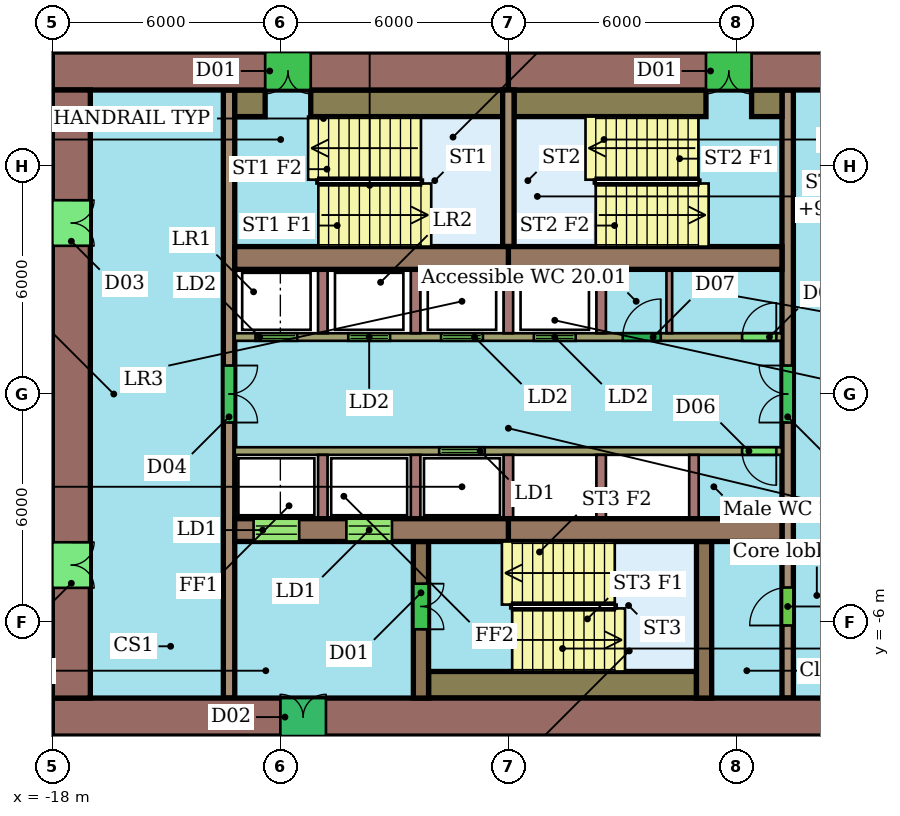
"""IFC4 building model, lengths in metres.
Left out: names, types, materials, properties, quantities, classifications, styles, units other than length and angle.
Written with IfcOpenShell. Run it as: python <this file> out.ifc"""

import sys

from ifc_helpers import new_model, si_unit, direction, frame, frame_2d, origin, place, context, subcontext, project, spatial, rectangle, extrude, element, fill, save


model = new_model("IFC4")
c1 = context("Model", 3, precision=1e-05, world=origin(), true_north=direction((0.0, 1.0)))
c2 = subcontext(c1, "Body", "Model", "MODEL_VIEW")
j1 = project(units=[si_unit("LENGTHUNIT", "METRE"), si_unit("PLANEANGLEUNIT", "RADIAN")], contexts=[c1])
p1 = place(None, origin())
s1 = spatial("IfcSite", under=j1, at=p1, CompositionType="ELEMENT")
p2 = place(p1, origin())
s2 = spatial("IfcBuilding", under=s1, at=p2, CompositionType="ELEMENT")
p3 = place(p2, frame((0.0, 0.0, 92.2)))
s3 = spatial("IfcBuildingStorey", under=s2, at=p3, CompositionType="ELEMENT", Elevation=92.2)
p4 = place(p3, frame((6.0, 8.5, 0.0), z_axis=(0.0, 0.0, 1.0), x_axis=(-1.0, 0.0, 0.0)))
e1 = element("IfcWall", 1, at=p4, inside=s3, PredefinedType="SHEAR", context=c2, shape_type="SweptSolid", body=[
    extrude(rectangle(XDim=12.0, YDim=1.0, at=frame_2d((6.0, 0.0))), origin(), (0.0, 0.0, 1.0), 3.3),
])
p5 = place(p4, frame((5.6, 0.0, 0.0)))
e2 = element("IfcOpeningElement", 2, at=p5, cuts=e1, PredefinedType="OPENING", context=c2, shape_type="SweptSolid", body=[
    extrude(rectangle(XDim=1.2, YDim=2.1, at=frame_2d((0.6, 1.05))), frame((0.0, 0.51, 0.0), z_axis=(0.0, -1.0, 0.0), x_axis=(1.0, 0.0, 0.0)), (0.0, 0.0, 1.0), 1.02),
])
p6 = place(p3, frame((-6.0, 8.5, 0.0), z_axis=(0.0, 0.0, 1.0), x_axis=(-1.0, 0.0, 0.0)))
e3 = element("IfcWall", 3, at=p6, inside=s3, PredefinedType="SHEAR", context=c2, shape_type="SweptSolid", body=[
    extrude(rectangle(XDim=12.0, YDim=1.0, at=frame_2d((6.0, 0.0))), origin(), (0.0, 0.0, 1.0), 3.3),
])
p7 = place(p6, frame((5.2, 0.0, 0.0)))
e4 = element("IfcOpeningElement", 4, at=p7, cuts=e3, PredefinedType="OPENING", context=c2, shape_type="SweptSolid", body=[
    extrude(rectangle(XDim=1.2, YDim=2.1, at=frame_2d((0.6, 1.05))), frame((0.0, 0.51, 0.0), z_axis=(0.0, -1.0, 0.0), x_axis=(1.0, 0.0, 0.0)), (0.0, 0.0, 1.0), 1.02),
])
p8 = place(p3, frame((-18.0, -8.5, 0.0), z_axis=(0.0, 0.0, 1.0), x_axis=(1.0, 0.0, 0.0)))
e5 = element("IfcWall", 5, at=p8, inside=s3, PredefinedType="SHEAR", context=c2, shape_type="SweptSolid", body=[
    extrude(rectangle(XDim=24.0, YDim=1.0, at=frame_2d((12.0, 0.0))), origin(), (0.0, 0.0, 1.0), 3.3),
])
p9 = place(p8, frame((6.0, 0.0, 0.0)))
e6 = element("IfcOpeningElement", 6, at=p9, cuts=e5, PredefinedType="OPENING", context=c2, shape_type="SweptSolid", body=[
    extrude(rectangle(XDim=1.2, YDim=2.1, at=frame_2d((0.6, 1.05))), frame((0.0, 0.51, 0.0), z_axis=(0.0, -1.0, 0.0), x_axis=(1.0, 0.0, 0.0)), (0.0, 0.0, 1.0), 1.02),
])
p10 = place(p3, frame((-17.5, 8.0, 0.0), z_axis=(0.0, 0.0, 1.0), x_axis=(0.0, -1.0, 0.0)))
e7 = element("IfcWall", 7, at=p10, inside=s3, PredefinedType="SHEAR", context=c2, shape_type="SweptSolid", body=[
    extrude(rectangle(XDim=16.0, YDim=1.0, at=frame_2d((8.0, 0.0))), origin(), (0.0, 0.0, 1.0), 3.3),
])
p11 = place(p10, frame((11.9, 0.0, 0.0)))
e8 = element("IfcOpeningElement", 8, at=p11, cuts=e7, PredefinedType="OPENING", context=c2, shape_type="SweptSolid", body=[
    extrude(rectangle(XDim=1.2, YDim=2.1, at=frame_2d((0.6, 1.05))), frame((0.0, 0.51, 0.0), z_axis=(0.0, -1.0, 0.0), x_axis=(1.0, 0.0, 0.0)), (0.0, 0.0, 1.0), 1.02),
])
p12 = place(p10, frame((2.9, 0.0, 0.0)))
e9 = element("IfcOpeningElement", 9, at=p12, cuts=e7, PredefinedType="OPENING", context=c2, shape_type="SweptSolid", body=[
    extrude(rectangle(XDim=1.2, YDim=2.1, at=frame_2d((0.6, 1.05))), frame((0.0, 0.51, 0.0), z_axis=(0.0, -1.0, 0.0), x_axis=(1.0, 0.0, 0.0)), (0.0, 0.0, 1.0), 1.02),
])
for number, where, z_axis, x_axis in (
    (10, (-13.2, 3.58, 0.0), (0.0, 0.0, 1.0), (1.0, 0.0, 0.0)),
    (11, (-6.0, 3.58, 0.0), (0.0, 0.0, 1.0), (1.0, 0.0, 0.0)),
):
    element("IfcWall", number, at=place(p3, frame(where, z_axis=z_axis, x_axis=x_axis)), inside=s3, PredefinedType="SHEAR", context=c2, shape_type="SweptSolid", body=[
        extrude(rectangle(XDim=7.2, YDim=0.6, at=frame_2d((3.6, 0.0))), origin(), (0.0, 0.0, 1.0), 3.3),
    ])
p13 = place(p3, frame((-13.2, -3.58, 0.0), z_axis=(0.0, 0.0, 1.0), x_axis=(1.0, 0.0, 0.0)))
e12 = element("IfcWall", 12, at=p13, inside=s3, PredefinedType="SHEAR", context=c2, shape_type="SweptSolid", body=[
    extrude(rectangle(XDim=7.2, YDim=0.6, at=frame_2d((3.6, 0.0))), origin(), (0.0, 0.0, 1.0), 3.3),
])
p14 = place(p13, frame((0.496, 0.0, 0.0)))
e13 = element("IfcOpeningElement", 13, at=p14, cuts=e12, PredefinedType="OPENING", context=c2, shape_type="SweptSolid", body=[
    extrude(rectangle(XDim=1.2, YDim=2.1, at=frame_2d((0.6, 1.05))), frame((0.0, 0.31, 0.0), z_axis=(0.0, -1.0, 0.0), x_axis=(1.0, 0.0, 0.0)), (0.0, 0.0, 1.0), 0.62),
])
p15 = place(p13, frame((2.938, 0.0, 0.0)))
e14 = element("IfcOpeningElement", 14, at=p15, cuts=e12, PredefinedType="OPENING", context=c2, shape_type="SweptSolid", body=[
    extrude(rectangle(XDim=1.2, YDim=2.1, at=frame_2d((0.6, 1.05))), frame((0.0, 0.31, 0.0), z_axis=(0.0, -1.0, 0.0), x_axis=(1.0, 0.0, 0.0)), (0.0, 0.0, 1.0), 0.62),
])
p16 = place(p3, frame((-6.0, -3.58, 0.0), z_axis=(0.0, 0.0, 1.0), x_axis=(1.0, 0.0, 0.0)))
e15 = element("IfcWall", 15, at=p16, inside=s3, PredefinedType="SHEAR", context=c2, shape_type="SweptSolid", body=[
    extrude(rectangle(XDim=7.2, YDim=0.6, at=frame_2d((3.6, 0.0))), origin(), (0.0, 0.0, 1.0), 3.3),
])
p17 = place(p3, frame((-13.35, 8.0, 0.0), z_axis=(0.0, 0.0, 1.0), x_axis=(0.0, -1.0, 0.0)))
e16 = element("IfcWall", 16, at=p17, inside=s3, PredefinedType="SHEAR", context=c2, shape_type="SweptSolid", body=[
    extrude(rectangle(XDim=16.0, YDim=0.3, at=frame_2d((8.0, 0.0))), origin(), (0.0, 0.0, 1.0), 3.3),
])
p18 = place(p17, frame((7.25, 0.0, 0.0)))
e17 = element("IfcOpeningElement", 17, at=p18, cuts=e16, PredefinedType="OPENING", context=c2, shape_type="SweptSolid", body=[
    extrude(rectangle(XDim=1.5, YDim=2.1, at=frame_2d((0.75, 1.05))), frame((0.0, 0.16, 0.0), z_axis=(0.0, -1.0, 0.0), x_axis=(1.0, 0.0, 0.0)), (0.0, 0.0, 1.0), 0.32),
])
p19 = place(p3, frame((1.35, -8.0, 0.0), z_axis=(0.0, 0.0, 1.0), x_axis=(0.0, 1.0, 0.0)))
e18 = element("IfcWall", 18, at=p19, inside=s3, PredefinedType="SHEAR", context=c2, shape_type="SweptSolid", body=[
    extrude(rectangle(XDim=16.0, YDim=0.3, at=frame_2d((8.0, 0.0))), origin(), (0.0, 0.0, 1.0), 3.3),
])
p20 = place(p19, frame((1.91, 0.0, 0.0)))
e19 = element("IfcOpeningElement", 19, at=p20, cuts=e18, PredefinedType="OPENING", context=c2, shape_type="SweptSolid", body=[
    extrude(rectangle(XDim=1.0, YDim=2.1, at=frame_2d((0.5, 1.05))), frame((0.0, 0.16, 0.0), z_axis=(0.0, -1.0, 0.0), x_axis=(1.0, 0.0, 0.0)), (0.0, 0.0, 1.0), 0.32),
])
p21 = place(p19, frame((7.25, 0.0, 0.0)))
e20 = element("IfcOpeningElement", 20, at=p21, cuts=e18, PredefinedType="OPENING", context=c2, shape_type="SweptSolid", body=[
    extrude(rectangle(XDim=1.5, YDim=2.1, at=frame_2d((0.75, 1.05))), frame((0.0, 0.16, 0.0), z_axis=(0.0, -1.0, 0.0), x_axis=(1.0, 0.0, 0.0)), (0.0, 0.0, 1.0), 0.32),
])
p22 = place(p3, frame((-13.2, 1.5, 0.0), z_axis=(0.0, 0.0, 1.0), x_axis=(1.0, 0.0, 0.0)))
e21 = element("IfcWall", 21, at=p22, inside=s3, PredefinedType="SHEAR", context=c2, shape_type="SweptSolid", body=[
    extrude(rectangle(XDim=14.4, YDim=0.2, at=frame_2d((7.2, 0.0))), origin(), (0.0, 0.0, 1.0), 3.3),
])
p23 = place(p22, frame((0.546, 0.0, 0.0)))
e22 = element("IfcOpeningElement", 22, at=p23, cuts=e21, PredefinedType="OPENING", context=c2, shape_type="SweptSolid", body=[
    extrude(rectangle(XDim=1.1, YDim=2.1, at=frame_2d((0.55, 1.05))), frame((0.0, 0.11, 0.0), z_axis=(0.0, -1.0, 0.0), x_axis=(1.0, 0.0, 0.0)), (0.0, 0.0, 1.0), 0.22),
])
p24 = place(p22, frame((2.988, 0.0, 0.0)))
e23 = element("IfcOpeningElement", 23, at=p24, cuts=e21, PredefinedType="OPENING", context=c2, shape_type="SweptSolid", body=[
    extrude(rectangle(XDim=1.1, YDim=2.1, at=frame_2d((0.55, 1.05))), frame((0.0, 0.11, 0.0), z_axis=(0.0, -1.0, 0.0), x_axis=(1.0, 0.0, 0.0)), (0.0, 0.0, 1.0), 0.22),
])
p25 = place(p22, frame((5.429, 0.0, 0.0)))
e24 = element("IfcOpeningElement", 24, at=p25, cuts=e21, PredefinedType="OPENING", context=c2, shape_type="SweptSolid", body=[
    extrude(rectangle(XDim=1.1, YDim=2.1, at=frame_2d((0.55, 1.05))), frame((0.0, 0.11, 0.0), z_axis=(0.0, -1.0, 0.0), x_axis=(1.0, 0.0, 0.0)), (0.0, 0.0, 1.0), 0.22),
])
p26 = place(p22, frame((7.871, 0.0, 0.0)))
e25 = element("IfcOpeningElement", 25, at=p26, cuts=e21, PredefinedType="OPENING", context=c2, shape_type="SweptSolid", body=[
    extrude(rectangle(XDim=1.1, YDim=2.1, at=frame_2d((0.55, 1.05))), frame((0.0, 0.11, 0.0), z_axis=(0.0, -1.0, 0.0), x_axis=(1.0, 0.0, 0.0)), (0.0, 0.0, 1.0), 0.22),
])
p27 = place(p22, frame((10.21, 0.0, 0.0)))
e26 = element("IfcOpeningElement", 26, at=p27, cuts=e21, PredefinedType="OPENING", context=c2, shape_type="SweptSolid", body=[
    extrude(rectangle(XDim=1.0, YDim=2.1, at=frame_2d((0.5, 1.05))), frame((0.0, 0.11, 0.0), z_axis=(0.0, -1.0, 0.0), x_axis=(1.0, 0.0, 0.0)), (0.0, 0.0, 1.0), 0.22),
])
p28 = place(p22, frame((13.35, 0.0, 0.0)))
e27 = element("IfcOpeningElement", 27, at=p28, cuts=e21, PredefinedType="OPENING", context=c2, shape_type="SweptSolid", body=[
    extrude(rectangle(XDim=0.9, YDim=2.1, at=frame_2d((0.45, 1.05))), frame((0.0, 0.11, 0.0), z_axis=(0.0, -1.0, 0.0), x_axis=(1.0, 0.0, 0.0)), (0.0, 0.0, 1.0), 0.22),
])
p29 = place(p3, frame((1.2, -1.5, 0.0), z_axis=(0.0, 0.0, 1.0), x_axis=(-1.0, 0.0, 0.0)))
e28 = element("IfcWall", 28, at=p29, inside=s3, PredefinedType="SHEAR", context=c2, shape_type="SweptSolid", body=[
    extrude(rectangle(XDim=14.4, YDim=0.2, at=frame_2d((7.2, 0.0))), origin(), (0.0, 0.0, 1.0), 3.3),
])
p30 = place(p29, frame((7.821, 0.0, 0.0)))
e29 = element("IfcOpeningElement", 29, at=p30, cuts=e28, PredefinedType="OPENING", context=c2, shape_type="SweptSolid", body=[
    extrude(rectangle(XDim=1.2, YDim=2.1, at=frame_2d((0.6, 1.05))), frame((0.0, 0.11, 0.0), z_axis=(0.0, -1.0, 0.0), x_axis=(1.0, 0.0, 0.0)), (0.0, 0.0, 1.0), 0.22),
])
p31 = place(p29, frame((0.15, 0.0, 0.0)))
e30 = element("IfcOpeningElement", 30, at=p31, cuts=e28, PredefinedType="OPENING", context=c2, shape_type="SweptSolid", body=[
    extrude(rectangle(XDim=0.9, YDim=2.1, at=frame_2d((0.45, 1.05))), frame((0.0, 0.11, 0.0), z_axis=(0.0, -1.0, 0.0), x_axis=(1.0, 0.0, 0.0)), (0.0, 0.0, 1.0), 0.22),
])
p32 = place(p3, frame((-8.3, -3.88, 0.0), z_axis=(0.0, 0.0, 1.0), x_axis=(0.0, -1.0, 0.0)))
e31 = element("IfcWall", 31, at=p32, inside=s3, PredefinedType="SHEAR", context=c2, shape_type="SweptSolid", body=[
    extrude(rectangle(XDim=4.12, YDim=0.4, at=frame_2d((2.06, 0.0))), origin(), (0.0, 0.0, 1.0), 3.3),
])
p33 = place(p32, frame((1.11, 0.0, 0.0)))
e32 = element("IfcOpeningElement", 32, at=p33, cuts=e31, PredefinedType="OPENING", context=c2, shape_type="SweptSolid", body=[
    extrude(rectangle(XDim=1.2, YDim=2.1, at=frame_2d((0.6, 1.05))), frame((0.0, 0.21, 0.0), z_axis=(0.0, -1.0, 0.0), x_axis=(1.0, 0.0, 0.0)), (0.0, 0.0, 1.0), 0.42),
])
p34 = place(p3, frame((-0.85, -3.88, 0.0), z_axis=(0.0, 0.0, 1.0), x_axis=(0.0, -1.0, 0.0)))
e33 = element("IfcWall", 33, at=p34, inside=s3, PredefinedType="SHEAR", context=c2, shape_type="SweptSolid", body=[
    extrude(rectangle(XDim=4.12, YDim=0.4, at=frame_2d((2.06, 0.0))), origin(), (0.0, 0.0, 1.0), 3.3),
])
p35 = place(p3, frame((-6.0, 3.88, 0.0), z_axis=(0.0, 0.0, 1.0), x_axis=(0.0, 1.0, 0.0)))
e34 = element("IfcWall", 34, at=p35, inside=s3, PredefinedType="SHEAR", context=c2, shape_type="SweptSolid", body=[
    extrude(rectangle(XDim=4.12, YDim=0.3, at=frame_2d((2.06, 0.0))), origin(), (0.0, 0.0, 1.0), 3.3),
])
p36 = place(p3, frame((-13.2, 7.65, 0.0), z_axis=(0.0, 0.0, 1.0), x_axis=(1.0, 0.0, 0.0)))
e35 = element("IfcWall", 35, at=p36, inside=s3, PredefinedType="SHEAR", context=c2, shape_type="SweptSolid", body=[
    extrude(rectangle(XDim=0.8, YDim=0.7, at=frame_2d((0.4, 0.0))), origin(), (0.0, 0.0, 1.0), 3.3),
])
for number, where, z_axis, x_axis in (
    (36, (-11.2, 7.65, 0.0), (0.0, 0.0, 1.0), (1.0, 0.0, 0.0)),
    (37, (-5.85, 7.65, 0.0), (0.0, 0.0, 1.0), (1.0, 0.0, 0.0)),
):
    element("IfcWall", number, at=place(p3, frame(where, z_axis=z_axis, x_axis=x_axis)), inside=s3, PredefinedType="SHEAR", context=c2, shape_type="SweptSolid", body=[
        extrude(rectangle(XDim=5.05, YDim=0.7, at=frame_2d((2.525, 0.0))), origin(), (0.0, 0.0, 1.0), 3.3),
    ])
p37 = place(p3, frame((0.4, 7.65, 0.0), z_axis=(0.0, 0.0, 1.0), x_axis=(1.0, 0.0, 0.0)))
e38 = element("IfcWall", 38, at=p37, inside=s3, PredefinedType="SHEAR", context=c2, shape_type="SweptSolid", body=[
    extrude(rectangle(XDim=0.8, YDim=0.7, at=frame_2d((0.4, 0.0))), origin(), (0.0, 0.0, 1.0), 3.3),
])
p38 = place(p3, frame((-8.1, -7.65, 0.0), z_axis=(0.0, 0.0, 1.0), x_axis=(1.0, 0.0, 0.0)))
e39 = element("IfcWall", 39, at=p38, inside=s3, PredefinedType="SHEAR", context=c2, shape_type="SweptSolid", body=[
    extrude(rectangle(XDim=7.05, YDim=0.7, at=frame_2d((3.525, 0.0))), origin(), (0.0, 0.0, 1.0), 3.3),
])
for number, where, z_axis, x_axis in (
    (40, (-10.883, 1.6, 0.0), (0.0, 0.0, 1.0), (0.0, 1.0, 0.0)),
    (41, (-8.442, 1.6, 0.0), (0.0, 0.0, 1.0), (0.0, 1.0, 0.0)),
    (42, (-6.0, 1.6, 0.0), (0.0, 0.0, 1.0), (0.0, 1.0, 0.0)),
    (43, (-3.558, 1.6, 0.0), (0.0, 0.0, 1.0), (0.0, 1.0, 0.0)),
):
    element("IfcWall", number, at=place(p3, frame(where, z_axis=z_axis, x_axis=x_axis)), inside=s3, PredefinedType="SHEAR", context=c2, shape_type="SweptSolid", body=[
        extrude(rectangle(XDim=1.68, YDim=0.25, at=frame_2d((0.84, 0.0))), origin(), (0.0, 0.0, 1.0), 3.3),
    ])
p39 = place(p3, frame((-1.765, 1.6, 0.0), z_axis=(0.0, 0.0, 1.0), x_axis=(0.0, 1.0, 0.0)))
e44 = element("IfcWall", 44, at=p39, inside=s3, PredefinedType="PARTITIONING", context=c2, shape_type="SweptSolid", body=[
    extrude(rectangle(XDim=1.68, YDim=0.15, at=frame_2d((0.84, 0.0))), origin(), (0.0, 0.0, 1.0), 3.3),
])
for number, where, z_axis, x_axis in (
    (45, (-10.883, -1.6, 0.0), (0.0, 0.0, 1.0), (0.0, -1.0, 0.0)),
    (46, (-8.442, -1.6, 0.0), (0.0, 0.0, 1.0), (0.0, -1.0, 0.0)),
    (47, (-6.0, -1.6, 0.0), (0.0, 0.0, 1.0), (0.0, -1.0, 0.0)),
    (48, (-3.558, -1.6, 0.0), (0.0, 0.0, 1.0), (0.0, -1.0, 0.0)),
    (49, (-1.117, -1.6, 0.0), (0.0, 0.0, 1.0), (0.0, -1.0, 0.0)),
):
    element("IfcWall", number, at=place(p3, frame(where, z_axis=z_axis, x_axis=x_axis)), inside=s3, PredefinedType="SHEAR", context=c2, shape_type="SweptSolid", body=[
        extrude(rectangle(XDim=1.68, YDim=0.25, at=frame_2d((0.84, 0.0))), origin(), (0.0, 0.0, 1.0), 3.3),
    ])
p40 = place(p5, origin())
e50 = element("IfcDoor", 50, at=p40, inside=s3, OperationType="DOUBLE_DOOR_SINGLE_SWING", PredefinedType="NOTDEFINED", context=c2, shape_type="SweptSolid", body=[
    extrude(rectangle(XDim=1.2, YDim=2.1, at=frame_2d((0.6, 1.05))), frame((0.0, 0.025, 0.0), z_axis=(0.0, -1.0, 0.0), x_axis=(1.0, 0.0, 0.0)), (0.0, 0.0, 1.0), 0.05),
])
fill(e2, e50)
p41 = place(p7, origin())
e51 = element("IfcDoor", 51, at=p41, inside=s3, OperationType="DOUBLE_DOOR_SINGLE_SWING", PredefinedType="NOTDEFINED", context=c2, shape_type="SweptSolid", body=[
    extrude(rectangle(XDim=1.2, YDim=2.1, at=frame_2d((0.6, 1.05))), frame((0.0, 0.025, 0.0), z_axis=(0.0, -1.0, 0.0), x_axis=(1.0, 0.0, 0.0)), (0.0, 0.0, 1.0), 0.05),
])
fill(e4, e51)
p42 = place(p9, origin())
e52 = element("IfcDoor", 52, at=p42, inside=s3, OperationType="DOUBLE_DOOR_SINGLE_SWING", PredefinedType="NOTDEFINED", context=c2, shape_type="SweptSolid", body=[
    extrude(rectangle(XDim=1.2, YDim=2.1, at=frame_2d((0.6, 1.05))), frame((0.0, 0.025, 0.0), z_axis=(0.0, -1.0, 0.0), x_axis=(1.0, 0.0, 0.0)), (0.0, 0.0, 1.0), 0.05),
])
fill(e6, e52)
p43 = place(p11, origin())
e53 = element("IfcDoor", 53, at=p43, inside=s3, OperationType="DOUBLE_DOOR_SINGLE_SWING", PredefinedType="NOTDEFINED", context=c2, shape_type="SweptSolid", body=[
    extrude(rectangle(XDim=1.2, YDim=2.1, at=frame_2d((0.6, 1.05))), frame((0.0, 0.025, 0.0), z_axis=(0.0, -1.0, 0.0), x_axis=(1.0, 0.0, 0.0)), (0.0, 0.0, 1.0), 0.05),
])
fill(e8, e53)
p44 = place(p12, origin())
e54 = element("IfcDoor", 54, at=p44, inside=s3, OperationType="DOUBLE_DOOR_SINGLE_SWING", PredefinedType="NOTDEFINED", context=c2, shape_type="SweptSolid", body=[
    extrude(rectangle(XDim=1.2, YDim=2.1, at=frame_2d((0.6, 1.05))), frame((0.0, 0.025, 0.0), z_axis=(0.0, -1.0, 0.0), x_axis=(1.0, 0.0, 0.0)), (0.0, 0.0, 1.0), 0.05),
])
fill(e9, e54)
p45 = place(p14, origin())
e55 = element("IfcDoor", 55, at=p45, inside=s3, OperationType="DOUBLE_DOOR_SLIDING", PredefinedType="NOTDEFINED", context=c2, shape_type="SweptSolid", body=[
    extrude(rectangle(XDim=1.2, YDim=2.1, at=frame_2d((0.6, 1.05))), frame((0.0, 0.025, 0.0), z_axis=(0.0, -1.0, 0.0), x_axis=(1.0, 0.0, 0.0)), (0.0, 0.0, 1.0), 0.05),
])
fill(e13, e55)
p46 = place(p15, origin())
e56 = element("IfcDoor", 56, at=p46, inside=s3, OperationType="DOUBLE_DOOR_SLIDING", PredefinedType="NOTDEFINED", context=c2, shape_type="SweptSolid", body=[
    extrude(rectangle(XDim=1.2, YDim=2.1, at=frame_2d((0.6, 1.05))), frame((0.0, 0.025, 0.0), z_axis=(0.0, -1.0, 0.0), x_axis=(1.0, 0.0, 0.0)), (0.0, 0.0, 1.0), 0.05),
])
fill(e14, e56)
p47 = place(p18, origin())
e57 = element("IfcDoor", 57, at=p47, inside=s3, OperationType="DOUBLE_DOOR_SINGLE_SWING", PredefinedType="NOTDEFINED", context=c2, shape_type="SweptSolid", body=[
    extrude(rectangle(XDim=1.5, YDim=2.1, at=frame_2d((0.75, 1.05))), frame((0.0, 0.025, 0.0), z_axis=(0.0, -1.0, 0.0), x_axis=(1.0, 0.0, 0.0)), (0.0, 0.0, 1.0), 0.05),
])
fill(e17, e57)
p48 = place(p20, origin())
e58 = element("IfcDoor", 58, at=p48, inside=s3, OperationType="SINGLE_SWING_LEFT", PredefinedType="NOTDEFINED", context=c2, shape_type="SweptSolid", body=[
    extrude(rectangle(XDim=1.0, YDim=2.1, at=frame_2d((0.5, 1.05))), frame((0.0, 0.025, 0.0), z_axis=(0.0, -1.0, 0.0), x_axis=(1.0, 0.0, 0.0)), (0.0, 0.0, 1.0), 0.05),
])
fill(e19, e58)
p49 = place(p21, origin())
e59 = element("IfcDoor", 59, at=p49, inside=s3, OperationType="DOUBLE_DOOR_SINGLE_SWING", PredefinedType="NOTDEFINED", context=c2, shape_type="SweptSolid", body=[
    extrude(rectangle(XDim=1.5, YDim=2.1, at=frame_2d((0.75, 1.05))), frame((0.0, 0.025, 0.0), z_axis=(0.0, -1.0, 0.0), x_axis=(1.0, 0.0, 0.0)), (0.0, 0.0, 1.0), 0.05),
])
fill(e20, e59)
p50 = place(p23, origin())
e60 = element("IfcDoor", 60, at=p50, inside=s3, OperationType="DOUBLE_DOOR_SLIDING", PredefinedType="NOTDEFINED", context=c2, shape_type="SweptSolid", body=[
    extrude(rectangle(XDim=1.1, YDim=2.1, at=frame_2d((0.55, 1.05))), frame((0.0, 0.025, 0.0), z_axis=(0.0, -1.0, 0.0), x_axis=(1.0, 0.0, 0.0)), (0.0, 0.0, 1.0), 0.05),
])
fill(e22, e60)
p51 = place(p24, origin())
e61 = element("IfcDoor", 61, at=p51, inside=s3, OperationType="DOUBLE_DOOR_SLIDING", PredefinedType="NOTDEFINED", context=c2, shape_type="SweptSolid", body=[
    extrude(rectangle(XDim=1.1, YDim=2.1, at=frame_2d((0.55, 1.05))), frame((0.0, 0.025, 0.0), z_axis=(0.0, -1.0, 0.0), x_axis=(1.0, 0.0, 0.0)), (0.0, 0.0, 1.0), 0.05),
])
fill(e23, e61)
p52 = place(p25, origin())
e62 = element("IfcDoor", 62, at=p52, inside=s3, OperationType="DOUBLE_DOOR_SLIDING", PredefinedType="NOTDEFINED", context=c2, shape_type="SweptSolid", body=[
    extrude(rectangle(XDim=1.1, YDim=2.1, at=frame_2d((0.55, 1.05))), frame((0.0, 0.025, 0.0), z_axis=(0.0, -1.0, 0.0), x_axis=(1.0, 0.0, 0.0)), (0.0, 0.0, 1.0), 0.05),
])
fill(e24, e62)
p53 = place(p26, origin())
e63 = element("IfcDoor", 63, at=p53, inside=s3, OperationType="DOUBLE_DOOR_SLIDING", PredefinedType="NOTDEFINED", context=c2, shape_type="SweptSolid", body=[
    extrude(rectangle(XDim=1.1, YDim=2.1, at=frame_2d((0.55, 1.05))), frame((0.0, 0.025, 0.0), z_axis=(0.0, -1.0, 0.0), x_axis=(1.0, 0.0, 0.0)), (0.0, 0.0, 1.0), 0.05),
])
fill(e25, e63)
p54 = place(p27, origin())
e64 = element("IfcDoor", 64, at=p54, inside=s3, OperationType="SINGLE_SWING_RIGHT", PredefinedType="NOTDEFINED", context=c2, shape_type="SweptSolid", body=[
    extrude(rectangle(XDim=1.0, YDim=2.1, at=frame_2d((0.5, 1.05))), frame((0.0, 0.025, 0.0), z_axis=(0.0, -1.0, 0.0), x_axis=(1.0, 0.0, 0.0)), (0.0, 0.0, 1.0), 0.05),
])
fill(e26, e64)
p55 = place(p28, origin())
e65 = element("IfcDoor", 65, at=p55, inside=s3, OperationType="SINGLE_SWING_RIGHT", PredefinedType="NOTDEFINED", context=c2, shape_type="SweptSolid", body=[
    extrude(rectangle(XDim=0.9, YDim=2.1, at=frame_2d((0.45, 1.05))), frame((0.0, 0.025, 0.0), z_axis=(0.0, -1.0, 0.0), x_axis=(1.0, 0.0, 0.0)), (0.0, 0.0, 1.0), 0.05),
])
fill(e27, e65)
p56 = place(p30, origin())
e66 = element("IfcDoor", 66, at=p56, inside=s3, OperationType="DOUBLE_DOOR_SLIDING", PredefinedType="NOTDEFINED", context=c2, shape_type="SweptSolid", body=[
    extrude(rectangle(XDim=1.2, YDim=2.1, at=frame_2d((0.6, 1.05))), frame((0.0, 0.025, 0.0), z_axis=(0.0, -1.0, 0.0), x_axis=(1.0, 0.0, 0.0)), (0.0, 0.0, 1.0), 0.05),
])
fill(e29, e66)
p57 = place(p31, origin())
e67 = element("IfcDoor", 67, at=p57, inside=s3, OperationType="SINGLE_SWING_LEFT", PredefinedType="NOTDEFINED", context=c2, shape_type="SweptSolid", body=[
    extrude(rectangle(XDim=0.9, YDim=2.1, at=frame_2d((0.45, 1.05))), frame((0.0, 0.025, 0.0), z_axis=(0.0, -1.0, 0.0), x_axis=(1.0, 0.0, 0.0)), (0.0, 0.0, 1.0), 0.05),
])
fill(e30, e67)
p58 = place(p33, origin())
e68 = element("IfcDoor", 68, at=p58, inside=s3, OperationType="DOUBLE_DOOR_SINGLE_SWING", PredefinedType="NOTDEFINED", context=c2, shape_type="SweptSolid", body=[
    extrude(rectangle(XDim=1.2, YDim=2.1, at=frame_2d((0.6, 1.05))), frame((0.0, 0.025, 0.0), z_axis=(0.0, -1.0, 0.0), x_axis=(1.0, 0.0, 0.0)), (0.0, 0.0, 1.0), 0.05),
])
fill(e32, e68)
save(model, sys.argv[1])
